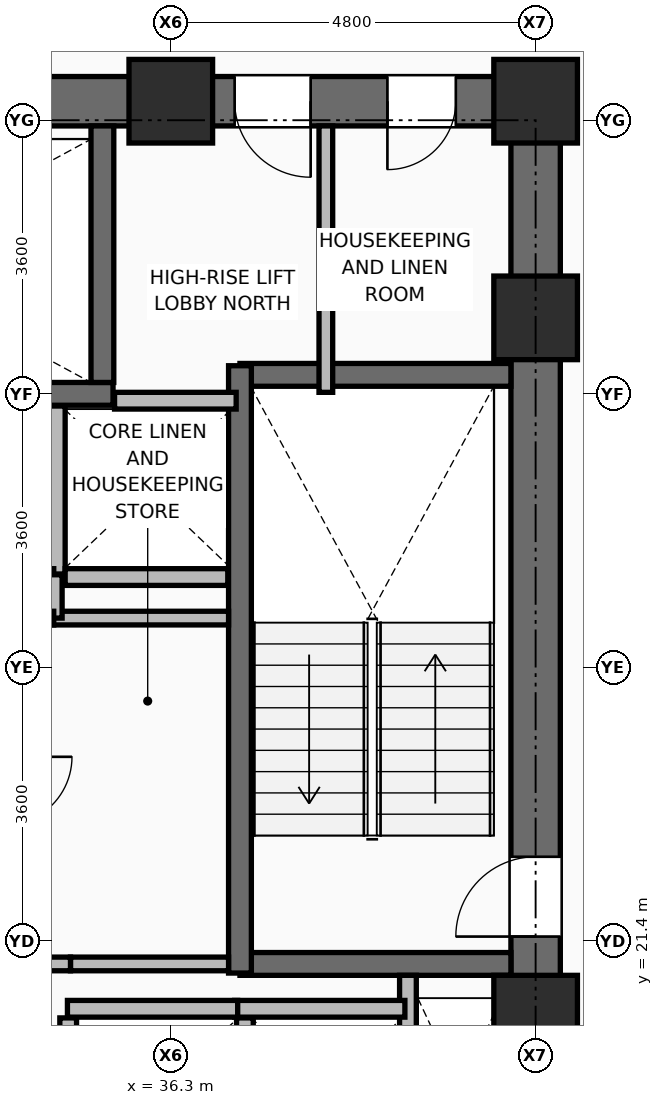
"""IFC4 building model, lengths in metres.
Left out: names, types, materials, properties, quantities, classifications, styles, units other than length and angle.
Written with IfcOpenShell. Run it as: python <this file> out.ifc"""

import sys

from ifc_helpers import new_model, si_unit, direction, frame, frame_2d, origin, origin_2d, place, context, subcontext, project, spatial, rectangle, extrude, element, fill, save


model = new_model("IFC4")
c1 = context("Model", 3, precision=1e-05, world=origin(), true_north=direction((0.0, 1.0)))
c2 = subcontext(c1, "Body", "Model", "MODEL_VIEW")
j1 = project(units=[si_unit("LENGTHUNIT", "METRE"), si_unit("PLANEANGLEUNIT", "RADIAN")], contexts=[c1])
p1 = place(None, origin())
s1 = spatial("IfcSite", under=j1, at=p1, CompositionType="ELEMENT")
p2 = place(p1, origin())
s2 = spatial("IfcBuilding", under=s1, at=p2, CompositionType="ELEMENT")
p3 = place(p2, frame((0.0, 0.0, 87.0)))
s3 = spatial("IfcBuildingStorey", under=s2, at=p3, CompositionType="ELEMENT", Elevation=87.0)
for number, where, z_axis, x_axis in (
    (1, (41.1, 20.4, 0.0), (0.0, 0.0, 1.0), (1.0, 0.0, 0.0)),
    (2, (41.1, 29.6, 0.0), (0.0, 0.0, 1.0), (1.0, 0.0, 0.0)),
    (3, (36.3, 32.45, 0.0), (0.0, 0.0, 1.0), (1.0, 0.0, 0.0)),
    (4, (41.1, 32.45, 0.0), (0.0, 0.0, 1.0), (1.0, 0.0, 0.0)),
):
    element("IfcColumn", number, at=place(p3, frame(where, z_axis=z_axis, x_axis=x_axis)), inside=s3, PredefinedType="COLUMN", context=c2, shape_type="SweptSolid", body=[
        extrude(rectangle(XDim=1.1, YDim=1.1, at=origin_2d()), origin(), (0.0, 0.0, 1.0), 3.75),
    ])
p4 = place(p3, frame((34.95, 17.92, 0.0), z_axis=(0.0, 0.0, 1.0), x_axis=(0.0, 1.0, 0.0)))
e5 = element("IfcWall", 5, at=p4, inside=s3, PredefinedType="PARTITIONING", context=c2, shape_type="SweptSolid", body=[
    extrude(rectangle(XDim=2.47, YDim=0.22, at=frame_2d((1.235, 0.0))), origin(), (0.0, 0.0, 1.0), 2.858),
])
p5 = place(p3, frame((37.275, 18.08, 0.0), z_axis=(0.0, 0.0, 1.0), x_axis=(0.0, 1.0, 0.0)))
e6 = element("IfcWall", 6, at=p5, inside=s3, PredefinedType="PARTITIONING", context=c2, shape_type="SweptSolid", body=[
    extrude(rectangle(XDim=2.31, YDim=0.22, at=frame_2d((1.155, 0.0))), origin(), (0.0, 0.0, 1.0), 3.475),
])
p6 = place(p3, frame((34.8, 26.23, 0.0), z_axis=(0.0, 0.0, 1.0), x_axis=(0.0, 1.0, 0.0)))
e7 = element("IfcWall", 7, at=p6, inside=s3, PredefinedType="PARTITIONING", context=c2, shape_type="SweptSolid", body=[
    extrude(rectangle(XDim=2.21, YDim=0.22, at=frame_2d((1.105, 0.0))), origin(), (0.0, 0.0, 1.0), 3.475),
])
p7 = place(p3, frame((34.91, 26.19, 0.0), z_axis=(0.0, 0.0, 1.0), x_axis=(1.0, 0.0, 0.0)))
e8 = element("IfcWall", 8, at=p7, inside=s3, PredefinedType="PARTITIONING", context=c2, shape_type="SweptSolid", body=[
    extrude(rectangle(XDim=2.14, YDim=0.22, at=frame_2d((1.07, 0.0))), origin(), (0.0, 0.0, 1.0), 3.475),
])
p8 = place(p3, frame((21.575, 32.45, 0.0), z_axis=(0.0, 0.0, 1.0), x_axis=(1.0, 0.0, 0.0)))
e9 = element("IfcWall", 9, at=p8, inside=s3, PredefinedType="SHEAR", context=c2, shape_type="SweptSolid", body=[
    extrude(rectangle(XDim=19.85, YDim=0.65, at=frame_2d((9.925, 0.0))), origin(), (0.0, 0.0, 1.0), 3.5),
])
p9 = place(p8, frame((2.175, 0.0, 0.0)))
e10 = element("IfcOpeningElement", 10, at=p9, cuts=e9, PredefinedType="OPENING", context=c2, shape_type="SweptSolid", body=[
    extrude(rectangle(XDim=1.1, YDim=2.1, at=frame_2d((0.55, 1.05))), frame((0.0, 0.335, 0.0), z_axis=(0.0, -1.0, 0.0), x_axis=(1.0, 0.0, 0.0)), (0.0, 0.0, 1.0), 0.67),
])
p10 = place(p8, frame((15.565, 0.0, 0.0)))
e11 = element("IfcOpeningElement", 11, at=p10, cuts=e9, PredefinedType="OPENING", context=c2, shape_type="SweptSolid", body=[
    extrude(rectangle(XDim=1.0, YDim=2.1, at=frame_2d((0.5, 1.05))), frame((0.0, 0.335, 0.0), z_axis=(0.0, -1.0, 0.0), x_axis=(1.0, 0.0, 0.0)), (0.0, 0.0, 1.0), 0.67),
])
p11 = place(p8, frame((17.575, 0.0, 0.0)))
e12 = element("IfcOpeningElement", 12, at=p11, cuts=e9, PredefinedType="OPENING", context=c2, shape_type="SweptSolid", body=[
    extrude(rectangle(XDim=0.9, YDim=2.1, at=frame_2d((0.45, 1.05))), frame((0.0, 0.335, 0.0), z_axis=(0.0, -1.0, 0.0), x_axis=(1.0, 0.0, 0.0)), (0.0, 0.0, 1.0), 0.67),
])
p12 = place(p3, frame((41.1, 18.125, 0.0), z_axis=(0.0, 0.0, 1.0), x_axis=(0.0, 1.0, 0.0)))
e13 = element("IfcWall", 13, at=p12, inside=s3, PredefinedType="SHEAR", context=c2, shape_type="SweptSolid", body=[
    extrude(rectangle(XDim=14.0, YDim=0.65, at=frame_2d((7.0, 0.0))), origin(), (0.0, 0.0, 1.0), 3.5),
])
p13 = place(p12, frame((3.335, 0.0, 0.0)))
e14 = element("IfcOpeningElement", 14, at=p13, cuts=e13, PredefinedType="OPENING", context=c2, shape_type="SweptSolid", body=[
    extrude(rectangle(XDim=1.05, YDim=2.1, at=frame_2d((0.525, 1.05))), frame((0.0, 0.335, 0.0), z_axis=(0.0, -1.0, 0.0), x_axis=(1.0, 0.0, 0.0)), (0.0, 0.0, 1.0), 0.67),
])
for number, where, z_axis, x_axis in (
    (15, (37.21, 21.1, 0.0), (0.0, 0.0, 1.0), (1.0, 0.0, 0.0)),
    (16, (37.21, 28.85, 0.0), (0.0, 0.0, 1.0), (1.0, 0.0, 0.0)),
):
    element("IfcWall", number, at=place(p3, frame(where, z_axis=z_axis, x_axis=x_axis)), inside=s3, PredefinedType="SHEAR", context=c2, shape_type="SweptSolid", body=[
        extrude(rectangle(XDim=3.565, YDim=0.3, at=frame_2d((1.782, 0.0))), origin(), (0.0, 0.0, 1.0), 3.5),
    ])
p14 = place(p3, frame((37.21, 20.98, 0.0), z_axis=(0.0, 0.0, 1.0), x_axis=(0.0, 1.0, 0.0)))
e17 = element("IfcWall", 17, at=p14, inside=s3, PredefinedType="SHEAR", context=c2, shape_type="SweptSolid", body=[
    extrude(rectangle(XDim=7.99, YDim=0.3, at=frame_2d((3.995, 0.0))), origin(), (0.0, 0.0, 1.0), 3.5),
])
p15 = place(p3, frame((27.51, 28.6, 0.0), z_axis=(0.0, 0.0, 1.0), x_axis=(1.0, 0.0, 0.0)))
e18 = element("IfcWall", 18, at=p15, inside=s3, PredefinedType="SHEAR", context=c2, shape_type="SweptSolid", body=[
    extrude(rectangle(XDim=8.03, YDim=0.3, at=frame_2d((4.015, 0.0))), origin(), (0.0, 0.0, 1.0), 3.5),
])
p16 = place(p3, frame((35.4, 28.75, 0.0), z_axis=(0.0, 0.0, 1.0), x_axis=(0.0, 1.0, 0.0)))
e19 = element("IfcWall", 19, at=p16, inside=s3, PredefinedType="SHEAR", context=c2, shape_type="SweptSolid", body=[
    extrude(rectangle(XDim=3.375, YDim=0.3, at=frame_2d((1.688, 0.0))), origin(), (0.0, 0.0, 1.0), 3.5),
])
p17 = place(p3, frame((39.42, 18.125, 0.0), z_axis=(0.0, 0.0, 1.0), x_axis=(0.0, 1.0, 0.0)))
e20 = element("IfcWall", 20, at=p17, inside=s3, PredefinedType="PARTITIONING", context=c2, shape_type="SweptSolid", body=[
    extrude(rectangle(XDim=2.825, YDim=0.22, at=frame_2d((1.413, 0.0))), origin(), (0.0, 0.0, 1.0), 3.48),
])
for number, where, z_axis, x_axis in (
    (21, (37.14, 20.51, 0.0), (0.0, 0.0, 1.0), (1.0, 0.0, 0.0)),
    (22, (34.94, 20.51, 0.0), (0.0, 0.0, 1.0), (1.0, 0.0, 0.0)),
):
    element("IfcWall", number, at=place(p3, frame(where, z_axis=z_axis, x_axis=x_axis)), inside=s3, PredefinedType="PARTITIONING", context=c2, shape_type="SweptSolid", body=[
        extrude(rectangle(XDim=2.24, YDim=0.22, at=frame_2d((1.12, 0.0))), origin(), (0.0, 0.0, 1.0), 3.48),
    ])
p18 = place(p3, frame((32.44, 26.19, 0.0), z_axis=(0.0, 0.0, 1.0), x_axis=(1.0, 0.0, 0.0)))
e23 = element("IfcWall", 23, at=p18, inside=s3, PredefinedType="PARTITIONING", context=c2, shape_type="SweptSolid", body=[
    extrude(rectangle(XDim=2.32, YDim=0.22, at=frame_2d((1.16, 0.0))), origin(), (0.0, 0.0, 1.0), 3.48),
])
p19 = place(p3, frame((35.56, 28.51, 0.0), z_axis=(0.0, 0.0, 1.0), x_axis=(1.0, 0.0, 0.0)))
e24 = element("IfcWall", 24, at=p19, inside=s3, PredefinedType="PARTITIONING", context=c2, shape_type="SweptSolid", body=[
    extrude(rectangle(XDim=1.6, YDim=0.22, at=frame_2d((0.8, 0.0))), origin(), (0.0, 0.0, 1.0), 3.48),
])
p20 = place(p3, frame((34.98, 21.1, 0.0), z_axis=(0.0, 0.0, 1.0), x_axis=(1.0, 0.0, 0.0)))
e25 = element("IfcWall", 25, at=p20, inside=s3, PredefinedType="PARTITIONING", context=c2, shape_type="SweptSolid", body=[
    extrude(rectangle(XDim=2.08, YDim=0.18, at=frame_2d((1.04, 0.0))), origin(), (0.0, 0.0, 1.0), 3.48),
])
p21 = place(p3, frame((34.72, 25.65, 0.0), z_axis=(0.0, 0.0, 1.0), x_axis=(1.0, 0.0, 0.0)))
e26 = element("IfcWall", 26, at=p21, inside=s3, PredefinedType="PARTITIONING", context=c2, shape_type="SweptSolid", body=[
    extrude(rectangle(XDim=2.34, YDim=0.18, at=frame_2d((1.17, 0.0))), origin(), (0.0, 0.0, 1.0), 3.48),
])
p22 = place(p3, frame((34.76, 25.65, 0.0), z_axis=(0.0, 0.0, 1.0), x_axis=(0.0, 1.0, 0.0)))
e27 = element("IfcWall", 27, at=p22, inside=s3, PredefinedType="PARTITIONING", context=c2, shape_type="SweptSolid", body=[
    extrude(rectangle(XDim=0.57, YDim=0.22, at=frame_2d((0.285, 0.0))), origin(), (0.0, 0.0, 1.0), 3.48),
])
p23 = place(p3, frame((34.1, 21.1, 0.0), z_axis=(0.0, 0.0, 1.0), x_axis=(1.0, 0.0, 0.0)))
e28 = element("IfcWall", 28, at=p23, inside=s3, PredefinedType="PARTITIONING", context=c2, shape_type="SweptSolid", body=[
    extrude(rectangle(XDim=0.88, YDim=0.18, at=frame_2d((0.44, 0.0))), origin(), (0.0, 0.0, 1.0), 3.48),
])
p24 = place(p3, frame((34.1, 25.65, 0.0), z_axis=(0.0, 0.0, 1.0), x_axis=(1.0, 0.0, 0.0)))
e29 = element("IfcWall", 29, at=p24, inside=s3, PredefinedType="PARTITIONING", context=c2, shape_type="SweptSolid", body=[
    extrude(rectangle(XDim=0.66, YDim=0.18, at=frame_2d((0.33, 0.0))), origin(), (0.0, 0.0, 1.0), 3.48),
])
p25 = place(p3, frame((38.34, 28.62, 0.0), z_axis=(0.0, 0.0, 1.0), x_axis=(0.0, 1.0, 0.0)))
e30 = element("IfcWall", 30, at=p25, inside=s3, PredefinedType="PARTITIONING", context=c2, shape_type="SweptSolid", body=[
    extrude(rectangle(XDim=3.505, YDim=0.18, at=frame_2d((1.752, 0.0))), origin(), (0.0, 0.0, 1.0), 3.48),
])
p26 = place(p13, origin())
e31 = element("IfcDoor", 31, at=p26, inside=s3, OperationType="SINGLE_SWING_LEFT", PredefinedType="DOOR", context=c2, shape_type="SweptSolid", body=[
    extrude(rectangle(XDim=1.05, YDim=2.1, at=frame_2d((0.525, 1.05))), frame((0.0, 0.025, 0.0), z_axis=(0.0, -1.0, 0.0), x_axis=(1.0, 0.0, 0.0)), (0.0, 0.0, 1.0), 0.05),
])
fill(e14, e31)
p27 = place(p10, frame((1.0, 0.0, 0.0), z_axis=(0.0, 0.0, 1.0), x_axis=(-1.0, 0.0, 0.0)))
e32 = element("IfcDoor", 32, at=p27, inside=s3, OperationType="SINGLE_SWING_LEFT", PredefinedType="DOOR", context=c2, shape_type="SweptSolid", body=[
    extrude(rectangle(XDim=1.0, YDim=2.1, at=frame_2d((0.5, 1.05))), frame((0.0, 0.025, 0.0), z_axis=(0.0, -1.0, 0.0), x_axis=(1.0, 0.0, 0.0)), (0.0, 0.0, 1.0), 0.05),
])
fill(e11, e32)
p28 = place(p11, frame((0.9, 0.0, 0.0), z_axis=(0.0, 0.0, 1.0), x_axis=(-1.0, 0.0, 0.0)))
e33 = element("IfcDoor", 33, at=p28, inside=s3, OperationType="SINGLE_SWING_RIGHT", PredefinedType="DOOR", context=c2, shape_type="SweptSolid", body=[
    extrude(rectangle(XDim=0.9, YDim=2.1, at=frame_2d((0.45, 1.05))), frame((0.0, 0.025, 0.0), z_axis=(0.0, -1.0, 0.0), x_axis=(1.0, 0.0, 0.0)), (0.0, 0.0, 1.0), 0.05),
])
fill(e12, e33)
save(model, sys.argv[1])
